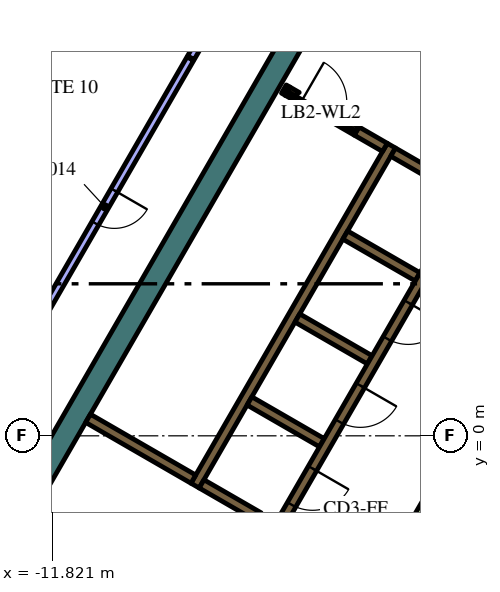
"""IFC4 building model, lengths in metres.
Left out: names, types, materials, properties, quantities, classifications, styles, units other than length and angle.
Written with IfcOpenShell. Run it as: python <this file> out.ifc"""

import sys

from ifc_helpers import new_model, si_unit, direction, frame, frame_2d, origin, place, context, subcontext, project, spatial, polyline, rectangle, outline, extrude, element, fill, save


model = new_model("IFC4")
c1 = context("Model", 3, precision=1e-05, world=origin(), true_north=direction((0.0, 1.0)))
c2 = subcontext(c1, "Body", "Model", "MODEL_VIEW")
j1 = project(units=[si_unit("LENGTHUNIT", "METRE"), si_unit("PLANEANGLEUNIT", "RADIAN")], contexts=[c1])
p1 = place(None, origin())
s1 = spatial("IfcSite", under=j1, at=p1, CompositionType="ELEMENT")
p2 = place(p1, origin())
s2 = spatial("IfcBuilding", under=s1, at=p2, CompositionType="ELEMENT")
p3 = place(p2, frame((0.0, 0.0, 304.8)))
s3 = spatial("IfcBuildingStorey", under=s2, at=p3, CompositionType="ELEMENT", Elevation=304.8)
p4 = place(p3, frame((-12.582, -1.892, 0.0), z_axis=(0.0, 0.0, 1.0), x_axis=(0.500003640647, 0.866023301845, 0.0)))
e1 = element("IfcWall", 1, at=p4, inside=s3, PredefinedType="SOLIDWALL", context=c2, shape_type="SweptSolid", body=[
    extrude(rectangle(XDim=15.858, YDim=0.6, at=frame_2d((7.929, 0.0))), origin(), (0.0, 0.0, 1.0), 4.2),
])
p5 = place(p3, frame((-8.06, -1.311, 0.0), z_axis=(0.0, 0.0, 1.0), x_axis=(0.50000273126, 0.866023826885, 0.0)))
e2 = element("IfcWall", 2, at=p5, inside=s3, PredefinedType="SOLIDWALL", context=c2, shape_type="SweptSolid", body=[
    extrude(rectangle(XDim=10.33, YDim=0.25, at=frame_2d((5.165, 0.0))), origin(), (0.0, 0.0, 1.0), 4.2),
])
p6 = place(p3, origin())
e3 = element("IfcWall", 3, at=p6, inside=s3, PredefinedType="SOLIDWALL", context=c2, shape_type="SweptSolid", body=[
    extrude(outline(polyline([(-2.912, 7.356), (-2.787, 7.573), (-1.232, 6.675), (-1.303, 6.675), (-1.304, 6.675), (-1.304, 6.675), (-1.304, 6.525), (-1.304, 6.525), (-1.303, 6.525), (-0.971, 6.525), (-0.665, 6.348), (-0.79, 6.132), (-1.007, 6.257), (-1.007, 6.257), (-2.912, 7.356)])), origin(), (0.0, 0.0, 1.0), 4.2),
])
for number, where, z_axis, x_axis in (
    (4, (-2.204, 4.182, 0.0), (0.0, 0.0, 1.0), (-0.866, 0.5, 0.0)),
    (5, (-5.369, 3.1, 0.0), (0.0, 0.0, 1.0), (0.866, -0.5, 0.0)),
    (6, (-4.724, -0.182, 0.0), (0.0, 0.0, 1.0), (-0.866, 0.5, 0.0)),
):
    element("IfcWall", number, at=place(p3, frame(where, z_axis=z_axis, x_axis=x_axis)), inside=s3, PredefinedType="SOLIDWALL", context=c2, shape_type="SweptSolid", body=[
        extrude(rectangle(XDim=2.2, YDim=0.25, at=frame_2d((1.1, 0.0))), origin(), (0.0, 0.0, 1.0), 4.2),
    ])
p7 = place(p3, frame((-7.889, -1.265, 0.0), z_axis=(0.0, 0.0, 1.0), x_axis=(0.865986741702, -0.500066958712, 0.0)))
e7 = element("IfcWall", 7, at=p7, inside=s3, PredefinedType="SOLIDWALL", context=c2, shape_type="SweptSolid", body=[
    extrude(rectangle(XDim=1.738, YDim=0.25, at=frame_2d((0.869, 0.0))), origin(), (0.0, 0.0, 1.0), 4.2),
])
p8 = place(p3, frame((-8.106, -1.14, 0.0), z_axis=(0.0, 0.0, 1.0), x_axis=(-0.866008981251, 0.500028443584, 0.0)))
e8 = element("IfcWall", 8, at=p8, inside=s3, PredefinedType="SOLIDWALL", context=c2, shape_type="SweptSolid", body=[
    extrude(rectangle(XDim=3.2, YDim=0.25, at=frame_2d((1.6, 0.0))), origin(), (0.0, 0.0, 1.0), 4.2),
])
p9 = place(p3, frame((-5.725, 9.125, 0.0), z_axis=(0.0, 0.0, 1.0), x_axis=(0.866185586049, -0.49972245349, 0.0)))
e9 = element("IfcWall", 9, at=p9, inside=s3, PredefinedType="SOLIDWALL", context=c2, shape_type="SweptSolid", body=[
    extrude(rectangle(XDim=0.11, YDim=0.25, at=frame_2d((0.055, 0.0))), origin(), (0.0, 0.0, 1.0), 4.2),
])
p10 = place(p3, frame((-3.066, 7.59, 0.0), z_axis=(0.0, 0.0, 1.0), x_axis=(-0.866081358704, 0.49990307071, 0.0)))
e10 = element("IfcWall", 10, at=p10, inside=s3, PredefinedType="SOLIDWALL", context=c2, shape_type="SweptSolid", body=[
    extrude(rectangle(XDim=0.858, YDim=0.25, at=frame_2d((0.429, 0.0))), origin(), (0.0, 0.0, 1.0), 4.2),
])
e11 = element("IfcWall", 11, at=p6, inside=s3, PredefinedType="SOLIDWALL", context=c2, shape_type="SweptSolid", body=[
    extrude(outline(polyline([(-3.748, 8.128), (-3.813, 8.015), (-4.027, 8.139), (-4.017, 8.156), (-4.008, 8.173), (-4.0, 8.192), (-3.995, 8.21), (-3.991, 8.23), (-3.99, 8.25), (-3.99, 8.268), (-3.748, 8.128)])), origin(), (0.0, 0.0, 1.0), 4.2),
])
e12 = element("IfcWall", 12, at=p6, inside=s3, PredefinedType="SOLIDWALL", context=c2, shape_type="SweptSolid", body=[
    extrude(outline(polyline([(-5.689, 8.96), (-5.69, 8.961), (-5.565, 9.177), (-5.319, 9.035), (-5.335, 9.026), (-5.351, 9.015), (-5.366, 9.002), (-5.379, 8.988), (-5.392, 8.972), (-5.402, 8.956), (-5.412, 8.939), (-5.629, 9.064), (-5.629, 9.064), (-5.689, 8.96)])), origin(), (0.0, 0.0, 1.0), 4.2),
])
p11 = place(p3, frame((-3.147, -3.718, 0.0), z_axis=(0.0, 0.0, 1.0), x_axis=(0.500010131483, 0.866019554291, 0.0)))
e13 = element("IfcWall", 13, at=p11, inside=s3, PredefinedType="PARTITIONING", context=c2, shape_type="SweptSolid", body=[
    extrude(rectangle(XDim=3.894, YDim=0.15, at=frame_2d((1.947, 0.0))), origin(), (0.0, 0.0, 1.0), 3.55),
])
p12 = place(p3, frame((-0.898, 6.194, 0.0), z_axis=(0.0, 0.0, 1.0), x_axis=(-0.499996202215, -0.866027596426, 0.0)))
e14 = element("IfcWall", 14, at=p12, inside=s3, PredefinedType="SOLIDWALL", context=c2, shape_type="SweptSolid", body=[
    extrude(rectangle(XDim=9.83, YDim=0.25, at=frame_2d((4.915, 0.0))), origin(), (0.0, 0.0, 1.0), 4.2),
])
p13 = place(p12, frame((0.585, 0.0, 0.0)))
e15 = element("IfcOpeningElement", 15, at=p13, cuts=e14, PredefinedType="OPENING", context=c2, shape_type="SweptSolid", body=[
    extrude(rectangle(XDim=1.1, YDim=2.1, at=frame_2d((0.55, 1.05))), frame((0.0, 0.135, 0.0), z_axis=(0.0, -1.0, 0.0), x_axis=(1.0, 0.0, 0.0)), (0.0, 0.0, 1.0), 0.27),
])
p14 = place(p12, frame((3.105, 0.0, 0.0)))
e16 = element("IfcOpeningElement", 16, at=p14, cuts=e14, PredefinedType="OPENING", context=c2, shape_type="SweptSolid", body=[
    extrude(rectangle(XDim=1.1, YDim=2.1, at=frame_2d((0.55, 1.05))), frame((0.0, 0.135, 0.0), z_axis=(0.0, -1.0, 0.0), x_axis=(1.0, 0.0, 0.0)), (0.0, 0.0, 1.0), 0.27),
])
p15 = place(p12, frame((5.625, 0.0, 0.0)))
e17 = element("IfcOpeningElement", 17, at=p15, cuts=e14, PredefinedType="OPENING", context=c2, shape_type="SweptSolid", body=[
    extrude(rectangle(XDim=1.1, YDim=2.1, at=frame_2d((0.55, 1.05))), frame((0.0, 0.135, 0.0), z_axis=(0.0, -1.0, 0.0), x_axis=(1.0, 0.0, 0.0)), (0.0, 0.0, 1.0), 0.27),
])
p16 = place(p12, frame((8.145, 0.0, 0.0)))
e18 = element("IfcOpeningElement", 18, at=p16, cuts=e14, PredefinedType="OPENING", context=c2, shape_type="SweptSolid", body=[
    extrude(rectangle(XDim=1.1, YDim=2.1, at=frame_2d((0.55, 1.05))), frame((0.0, 0.135, 0.0), z_axis=(0.0, -1.0, 0.0), x_axis=(1.0, 0.0, 0.0)), (0.0, 0.0, 1.0), 0.27),
])
p17 = place(p3, frame((-5.659, 9.012, 0.0), z_axis=(0.0, 0.0, 1.0), x_axis=(0.866009402589, -0.500027713859, 0.0)))
e19 = element("IfcWall", 19, at=p17, inside=s3, PredefinedType="PARTITIONING", context=c2, shape_type="SweptSolid", body=[
    extrude(rectangle(XDim=2.1, YDim=0.12, at=frame_2d((1.05, 0.0))), origin(), (0.0, 0.0, 1.0), 3.55),
])
p18 = place(p17, frame((0.45, 0.0, 0.0)))
e20 = element("IfcOpeningElement", 20, at=p18, cuts=e19, PredefinedType="OPENING", context=c2, shape_type="SweptSolid", body=[
    extrude(rectangle(XDim=1.2, YDim=2.1, at=frame_2d((0.6, 1.05))), frame((0.0, 0.07, 0.0), z_axis=(0.0, -1.0, 0.0), x_axis=(1.0, 0.0, 0.0)), (0.0, 0.0, 1.0), 0.14),
])
p19 = place(p3, frame((-8.186, 9.922, 0.0), z_axis=(0.0, 0.0, 1.0), x_axis=(-0.5000018851, -0.866024315419, 0.0)))
e21 = element("IfcWall", 21, at=p19, inside=s3, PredefinedType="PARTITIONING", context=c2, shape_type="SweptSolid", body=[
    extrude(rectangle(XDim=9.0, YDim=0.2, at=frame_2d((4.5, 0.0))), origin(), (0.0, 0.0, 1.0), 3.55),
])
p20 = place(p19, frame((4.0, 0.0, 0.0)))
e22 = element("IfcOpeningElement", 22, at=p20, cuts=e21, PredefinedType="OPENING", context=c2, shape_type="SweptSolid", body=[
    extrude(rectangle(XDim=1.0, YDim=2.1, at=frame_2d((0.5, 1.05))), frame((0.0, 0.11, 0.0), z_axis=(0.0, -1.0, 0.0), x_axis=(1.0, 0.0, 0.0)), (0.0, 0.0, 1.0), 0.22),
])
p21 = place(p3, frame((-7.275, 11.499, 0.0), z_axis=(0.0, 0.0, 1.0), x_axis=(-0.500025407441, -0.866010734295, 0.0)))
e23 = element("IfcWall", 23, at=p21, inside=s3, PredefinedType="PARTITIONING", context=c2, shape_type="SweptSolid", body=[
    extrude(rectangle(XDim=1.791, YDim=0.2, at=frame_2d((0.895, 0.0))), origin(), (0.0, 0.0, 1.0), 3.55),
])
p22 = place(p14, origin())
e24 = element("IfcDoor", 24, at=p22, inside=s3, OperationType="DOUBLE_DOOR_SLIDING", PredefinedType="DOOR", context=c2, shape_type="SweptSolid", body=[
    extrude(rectangle(XDim=1.1, YDim=2.1, at=frame_2d((0.55, 1.05))), frame((0.0, 0.025, 0.0), z_axis=(0.0, -1.0, 0.0), x_axis=(1.0, 0.0, 0.0)), (0.0, 0.0, 1.0), 0.05),
])
fill(e16, e24)
p23 = place(p15, origin())
e25 = element("IfcDoor", 25, at=p23, inside=s3, OperationType="DOUBLE_DOOR_SLIDING", PredefinedType="DOOR", context=c2, shape_type="SweptSolid", body=[
    extrude(rectangle(XDim=1.1, YDim=2.1, at=frame_2d((0.55, 1.05))), frame((0.0, 0.025, 0.0), z_axis=(0.0, -1.0, 0.0), x_axis=(1.0, 0.0, 0.0)), (0.0, 0.0, 1.0), 0.05),
])
fill(e17, e25)
p24 = place(p16, origin())
e26 = element("IfcDoor", 26, at=p24, inside=s3, OperationType="DOUBLE_DOOR_SLIDING", PredefinedType="DOOR", context=c2, shape_type="SweptSolid", body=[
    extrude(rectangle(XDim=1.1, YDim=2.1, at=frame_2d((0.55, 1.05))), frame((0.0, 0.025, 0.0), z_axis=(0.0, -1.0, 0.0), x_axis=(1.0, 0.0, 0.0)), (0.0, 0.0, 1.0), 0.05),
])
fill(e18, e26)
p25 = place(p18, origin())
e27 = element("IfcDoor", 27, at=p25, inside=s3, OperationType="SINGLE_SWING_LEFT", PredefinedType="DOOR", context=c2, shape_type="SweptSolid", body=[
    extrude(rectangle(XDim=1.2, YDim=2.1, at=frame_2d((0.6, 1.05))), frame((0.0, 0.025, 0.0), z_axis=(0.0, -1.0, 0.0), x_axis=(1.0, 0.0, 0.0)), (0.0, 0.0, 1.0), 0.05),
])
fill(e20, e27)
p26 = place(p20, origin())
e28 = element("IfcDoor", 28, at=p26, inside=s3, OperationType="SINGLE_SWING_LEFT", PredefinedType="DOOR", context=c2, shape_type="SweptSolid", body=[
    extrude(rectangle(XDim=1.0, YDim=2.1, at=frame_2d((0.5, 1.05))), frame((0.0, 0.025, 0.0), z_axis=(0.0, -1.0, 0.0), x_axis=(1.0, 0.0, 0.0)), (0.0, 0.0, 1.0), 0.05),
])
fill(e22, e28)
save(model, sys.argv[1])
